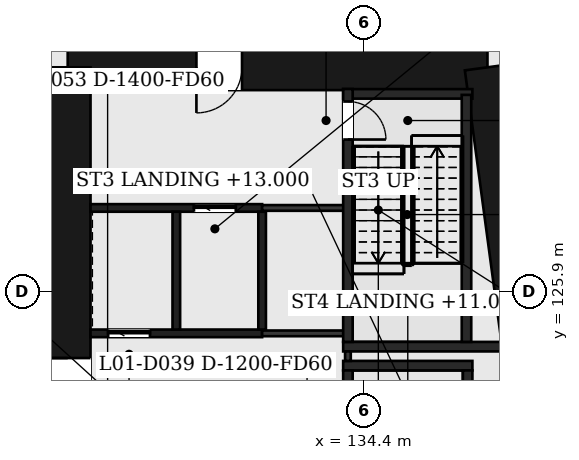
"""IFC4 building model, lengths in metres.
Left out: names, types, materials, properties, quantities, classifications, styles, units other than length and angle.
Written with IfcOpenShell. Run it as: python <this file> out.ifc"""

import sys

from ifc_helpers import new_model, si_unit, direction, frame, frame_2d, origin, place, context, subcontext, project, spatial, rectangle, extrude, element, fill, save


model = new_model("IFC4")
c1 = context("Model", 3, precision=1e-05, world=origin(), true_north=direction((0.0, 1.0)))
c2 = subcontext(c1, "Body", "Model", "MODEL_VIEW")
j1 = project(units=[si_unit("LENGTHUNIT", "METRE"), si_unit("PLANEANGLEUNIT", "RADIAN")], contexts=[c1])
p1 = place(None, origin())
s1 = spatial("IfcSite", under=j1, at=p1, CompositionType="ELEMENT")
p2 = place(p1, origin())
s2 = spatial("IfcBuilding", under=s1, at=p2, CompositionType="ELEMENT")
p3 = place(p2, frame((0.0, 0.0, 9.0)))
s3 = spatial("IfcBuildingStorey", under=s2, at=p3, CompositionType="ELEMENT", Elevation=9.0)
p4 = place(p3, frame((126.6, 131.8, 0.0), z_axis=(0.0, 0.0, 1.0), x_axis=(1.0, 0.0, 0.0)))
e1 = element("IfcWall", 1, at=p4, inside=s3, PredefinedType="SHEAR", context=c2, shape_type="SweptSolid", body=[
    extrude(rectangle(XDim=11.044, YDim=1.2, at=frame_2d((5.522, 0.0))), origin(), (0.0, 0.0, 1.0), 8.0),
])
p5 = place(p4, frame((3.386, 0.0, 0.0)))
e2 = element("IfcOpeningElement", 2, at=p5, cuts=e1, PredefinedType="OPENING", context=c2, shape_type="SweptSolid", body=[
    extrude(rectangle(XDim=1.2, YDim=2.1, at=frame_2d((0.6, 1.05))), frame((0.0, 0.61, 0.0), z_axis=(0.0, -1.0, 0.0), x_axis=(1.0, 0.0, 0.0)), (0.0, 0.0, 1.0), 1.22),
])
p6 = place(p3, frame((137.645, 131.8, 0.0), z_axis=(0.0, 0.0, 1.0), x_axis=(0.133413989637, -0.99106039542, 0.0)))
e3 = element("IfcWall", 3, at=p6, inside=s3, PredefinedType="SHEAR", context=c2, shape_type="SweptSolid", body=[
    extrude(rectangle(XDim=20.988, YDim=1.2, at=frame_2d((10.494, 0.0))), origin(), (0.0, 0.0, 1.0), 8.0),
])
p7 = place(p3, frame((126.6, 111.0, 0.0), z_axis=(0.0, 0.0, 1.0), x_axis=(0.0, 1.0, 0.0)))
e4 = element("IfcWall", 4, at=p7, inside=s3, PredefinedType="SHEAR", context=c2, shape_type="SweptSolid", body=[
    extrude(rectangle(XDim=20.8, YDim=1.2, at=frame_2d((10.4, 0.0))), origin(), (0.0, 0.0, 1.0), 8.0),
])
p8 = place(p7, frame((11.75, 0.0, 0.0)))
e5 = element("IfcOpeningElement", 5, at=p8, cuts=e4, PredefinedType="OPENING", context=c2, shape_type="SweptSolid", body=[
    extrude(rectangle(XDim=1.4, YDim=2.1, at=frame_2d((0.7, 1.05))), frame((0.0, 0.61, 0.0), z_axis=(0.0, -1.0, 0.0), x_axis=(1.0, 0.0, 0.0)), (0.0, 0.0, 1.0), 1.22),
])
p9 = place(p3, frame((133.848, 123.95, 0.0), z_axis=(0.0, 0.0, 1.0), x_axis=(1.0, 0.0, 0.0)))
e6 = element("IfcWall", 6, at=p9, inside=s3, PredefinedType="PARTITIONING", context=c2, shape_type="SweptSolid", body=[
    extrude(rectangle(XDim=3.4, YDim=0.25, at=frame_2d((1.7, 0.0))), origin(), (0.0, 0.0, 1.0), 7.5),
])
p10 = place(p3, frame((133.848, 124.45, 0.0), z_axis=(0.0, 0.0, 1.0), x_axis=(1.0, 0.0, 0.0)))
e7 = element("IfcWall", 7, at=p10, inside=s3, PredefinedType="PARTITIONING", context=c2, shape_type="SweptSolid", body=[
    extrude(rectangle(XDim=4.211, YDim=0.25, at=frame_2d((2.105, 0.0))), origin(), (0.0, 0.0, 1.0), 7.5),
])
p11 = place(p3, frame((127.2, 124.8, 0.0), z_axis=(0.0, 0.0, 1.0), x_axis=(1.0, 0.0, 0.0)))
e8 = element("IfcWall", 8, at=p11, inside=s3, PredefinedType="PARTITIONING", context=c2, shape_type="SweptSolid", body=[
    extrude(rectangle(XDim=4.515, YDim=0.2, at=frame_2d((2.258, 0.0))), origin(), (0.0, 0.0, 1.0), 7.5),
])
p12 = place(p11, frame((0.464, 0.0, 0.0)))
e9 = element("IfcOpeningElement", 9, at=p12, cuts=e8, PredefinedType="OPENING", context=c2, shape_type="SweptSolid", body=[
    extrude(rectangle(XDim=1.1, YDim=2.1, at=frame_2d((0.55, 1.05))), frame((0.0, 0.11, 0.0), z_axis=(0.0, -1.0, 0.0), x_axis=(1.0, 0.0, 0.0)), (0.0, 0.0, 1.0), 0.22),
])
p13 = place(p3, frame((131.715, 124.8, 0.0), z_axis=(0.0, 0.0, 1.0), x_axis=(1.0, 0.0, 0.0)))
e10 = element("IfcWall", 10, at=p13, inside=s3, PredefinedType="PARTITIONING", context=c2, shape_type="SweptSolid", body=[
    extrude(rectangle(XDim=2.383, YDim=0.15, at=frame_2d((1.191, 0.0))), origin(), (0.0, 0.0, 1.0), 7.5),
])
p14 = place(p3, frame((127.2, 128.1, 0.0), z_axis=(0.0, 0.0, 1.0), x_axis=(1.0, 0.0, 0.0)))
e11 = element("IfcWall", 11, at=p14, inside=s3, PredefinedType="PARTITIONING", context=c2, shape_type="SweptSolid", body=[
    extrude(rectangle(XDim=4.515, YDim=0.2, at=frame_2d((2.258, 0.0))), origin(), (0.0, 0.0, 1.0), 7.5),
])
p15 = place(p14, frame((2.722, 0.0, 0.0)))
e12 = element("IfcOpeningElement", 12, at=p15, cuts=e11, PredefinedType="OPENING", context=c2, shape_type="SweptSolid", body=[
    extrude(rectangle(XDim=1.1, YDim=2.1, at=frame_2d((0.55, 1.05))), frame((0.0, 0.11, 0.0), z_axis=(0.0, -1.0, 0.0), x_axis=(1.0, 0.0, 0.0)), (0.0, 0.0, 1.0), 0.22),
])
p16 = place(p3, frame((131.715, 128.1, 0.0), z_axis=(0.0, 0.0, 1.0), x_axis=(1.0, 0.0, 0.0)))
e13 = element("IfcWall", 13, at=p16, inside=s3, PredefinedType="PARTITIONING", context=c2, shape_type="SweptSolid", body=[
    extrude(rectangle(XDim=2.258, YDim=0.15, at=frame_2d((1.129, 0.0))), origin(), (0.0, 0.0, 1.0), 7.5),
])
p17 = place(p3, frame((133.848, 131.101, 0.0), z_axis=(0.0, 0.0, 1.0), x_axis=(1.0, 0.0, 0.0)))
e14 = element("IfcWall", 14, at=p17, inside=s3, PredefinedType="PARTITIONING", context=c2, shape_type="SweptSolid", body=[
    extrude(rectangle(XDim=3.4, YDim=0.25, at=frame_2d((1.7, 0.0))), origin(), (0.0, 0.0, 1.0), 7.5),
])
for number, where, z_axis, x_axis in (
    (15, (129.458, 124.9, 0.0), (0.0, 0.0, 1.0), (0.0, 1.0, 0.0)),
    (16, (131.715, 124.9, 0.0), (0.0, 0.0, 1.0), (0.0, 1.0, 0.0)),
):
    element("IfcWall", number, at=place(p3, frame(where, z_axis=z_axis, x_axis=x_axis)), inside=s3, PredefinedType="PARTITIONING", context=c2, shape_type="SweptSolid", body=[
        extrude(rectangle(XDim=3.1, YDim=0.2, at=frame_2d((1.55, 0.0))), origin(), (0.0, 0.0, 1.0), 7.5),
    ])
p18 = place(p3, frame((133.973, 124.075, 0.0), z_axis=(0.0, 0.0, 1.0), x_axis=(0.0, 1.0, 0.0)))
e17 = element("IfcWall", 17, at=p18, inside=s3, PredefinedType="PARTITIONING", context=c2, shape_type="SweptSolid", body=[
    extrude(rectangle(XDim=0.25, YDim=0.15, at=frame_2d((0.125, 0.0))), origin(), (0.0, 0.0, 1.0), 7.5),
])
p19 = place(p3, frame((133.973, 117.17, 0.0), z_axis=(0.0, 0.0, 1.0), x_axis=(0.0, 1.0, 0.0)))
e18 = element("IfcWall", 18, at=p19, inside=s3, PredefinedType="PARTITIONING", context=c2, shape_type="SweptSolid", body=[
    extrude(rectangle(XDim=6.655, YDim=0.25, at=frame_2d((3.328, 0.0))), origin(), (0.0, 0.0, 1.0), 7.5),
])
p20 = place(p19, frame((5.355, 0.0, 0.0)))
e19 = element("IfcOpeningElement", 19, at=p20, cuts=e18, PredefinedType="OPENING", context=c2, shape_type="SweptSolid", body=[
    extrude(rectangle(XDim=0.95, YDim=2.1, at=frame_2d((0.475, 1.05))), frame((0.0, 0.135, 0.0), z_axis=(0.0, -1.0, 0.0), x_axis=(1.0, 0.0, 0.0)), (0.0, 0.0, 1.0), 0.27),
])
p21 = place(p3, frame((133.973, 124.575, 0.0), z_axis=(0.0, 0.0, 1.0), x_axis=(0.0, 1.0, 0.0)))
e20 = element("IfcWall", 20, at=p21, inside=s3, PredefinedType="PARTITIONING", context=c2, shape_type="SweptSolid", body=[
    extrude(rectangle(XDim=6.655, YDim=0.25, at=frame_2d((3.328, 0.0))), origin(), (0.0, 0.0, 1.0), 7.5),
])
p22 = place(p21, frame((5.325, 0.0, 0.0)))
e21 = element("IfcOpeningElement", 21, at=p22, cuts=e20, PredefinedType="OPENING", context=c2, shape_type="SweptSolid", body=[
    extrude(rectangle(XDim=1.0, YDim=2.1, at=frame_2d((0.5, 1.05))), frame((0.0, 0.135, 0.0), z_axis=(0.0, -1.0, 0.0), x_axis=(1.0, 0.0, 0.0)), (0.0, 0.0, 1.0), 0.27),
])
p23 = place(p3, frame((137.123, 117.17, 0.0), z_axis=(0.0, 0.0, 1.0), x_axis=(0.0, 1.0, 0.0)))
e22 = element("IfcWall", 22, at=p23, inside=s3, PredefinedType="PARTITIONING", context=c2, shape_type="SweptSolid", body=[
    extrude(rectangle(XDim=6.655, YDim=0.25, at=frame_2d((3.328, 0.0))), origin(), (0.0, 0.0, 1.0), 7.5),
])
p24 = place(p3, frame((137.093, 124.575, 0.0), z_axis=(0.0, 0.0, 1.0), x_axis=(0.0, 1.0, 0.0)))
e23 = element("IfcWall", 23, at=p24, inside=s3, PredefinedType="PARTITIONING", context=c2, shape_type="SweptSolid", body=[
    extrude(rectangle(XDim=6.5, YDim=0.25, at=frame_2d((3.25, 0.0))), origin(), (0.0, 0.0, 1.0), 7.5),
])
p25 = place(p15, origin())
e24 = element("IfcDoor", 24, at=p25, inside=s3, OperationType="SLIDING_TO_LEFT", PredefinedType="DOOR", context=c2, shape_type="SweptSolid", body=[
    extrude(rectangle(XDim=1.1, YDim=2.1, at=frame_2d((0.55, 1.05))), frame((0.0, 0.025, 0.0), z_axis=(0.0, -1.0, 0.0), x_axis=(1.0, 0.0, 0.0)), (0.0, 0.0, 1.0), 0.05),
])
fill(e12, e24)
p26 = place(p12, origin())
e25 = element("IfcDoor", 25, at=p26, inside=s3, OperationType="SLIDING_TO_LEFT", PredefinedType="DOOR", context=c2, shape_type="SweptSolid", body=[
    extrude(rectangle(XDim=1.1, YDim=2.1, at=frame_2d((0.55, 1.05))), frame((0.0, 0.025, 0.0), z_axis=(0.0, -1.0, 0.0), x_axis=(1.0, 0.0, 0.0)), (0.0, 0.0, 1.0), 0.05),
])
fill(e9, e25)
p27 = place(p22, origin())
e26 = element("IfcDoor", 26, at=p27, inside=s3, OperationType="SINGLE_SWING_LEFT", PredefinedType="DOOR", context=c2, shape_type="SweptSolid", body=[
    extrude(rectangle(XDim=1.0, YDim=2.1, at=frame_2d((0.5, 1.05))), frame((0.0, 0.025, 0.0), z_axis=(0.0, -1.0, 0.0), x_axis=(1.0, 0.0, 0.0)), (0.0, 0.0, 1.0), 0.05),
])
fill(e21, e26)
p28 = place(p5, origin())
e27 = element("IfcDoor", 27, at=p28, inside=s3, OperationType="SINGLE_SWING_LEFT", PredefinedType="DOOR", context=c2, shape_type="SweptSolid", body=[
    extrude(rectangle(XDim=1.2, YDim=2.1, at=frame_2d((0.6, 1.05))), frame((0.0, 0.025, 0.0), z_axis=(0.0, -1.0, 0.0), x_axis=(1.0, 0.0, 0.0)), (0.0, 0.0, 1.0), 0.05),
])
fill(e2, e27)
p29 = place(p8, origin())
e28 = element("IfcDoor", 28, at=p29, inside=s3, OperationType="SINGLE_SWING_RIGHT", PredefinedType="DOOR", context=c2, shape_type="SweptSolid", body=[
    extrude(rectangle(XDim=1.4, YDim=2.1, at=frame_2d((0.7, 1.05))), frame((0.0, 0.025, 0.0), z_axis=(0.0, -1.0, 0.0), x_axis=(1.0, 0.0, 0.0)), (0.0, 0.0, 1.0), 0.05),
])
fill(e5, e28)
save(model, sys.argv[1])
